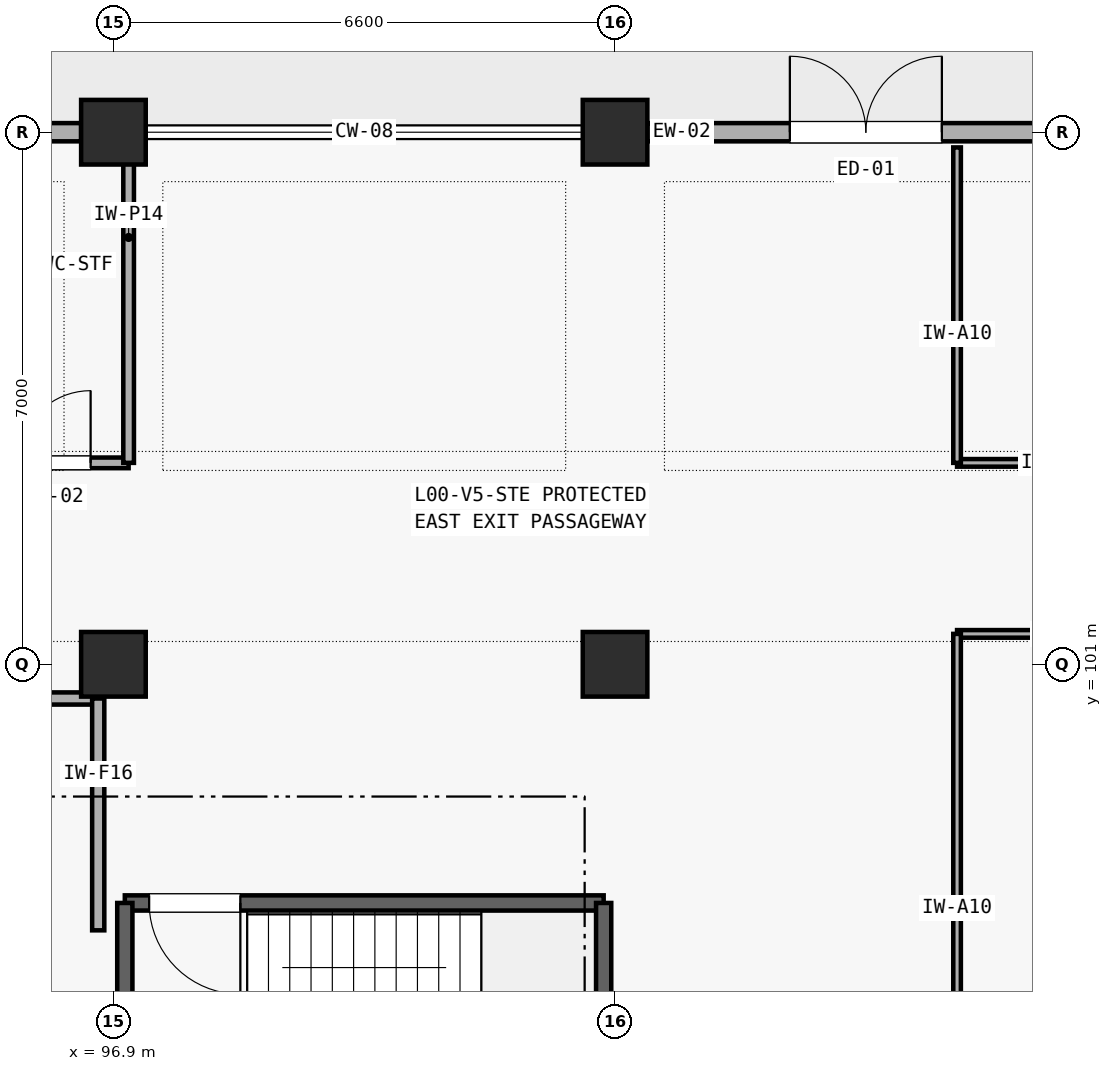
"""IFC4 building model, lengths in metres.
Left out: names, types, materials, properties, quantities, classifications, styles, units other than length and angle.
Written with IfcOpenShell. Run it as: python <this file> out.ifc"""

import sys

from ifc_helpers import new_model, si_unit, direction, frame, frame_2d, origin, origin_2d, place, context, subcontext, project, spatial, rectangle, extrude, element, fill, save


model = new_model("IFC4")
c1 = context("Model", 3, precision=1e-05, world=origin(), true_north=direction((0.0, 1.0)))
c2 = subcontext(c1, "Body", "Model", "MODEL_VIEW")
j1 = project(units=[si_unit("LENGTHUNIT", "METRE"), si_unit("PLANEANGLEUNIT", "RADIAN")], contexts=[c1])
p1 = place(None, origin())
s1 = spatial("IfcSite", under=j1, at=p1, CompositionType="ELEMENT")
p2 = place(p1, origin())
s2 = spatial("IfcBuilding", under=s1, at=p2, CompositionType="ELEMENT")
p3 = place(p2, origin())
s3 = spatial("IfcBuildingStorey", under=s2, at=p3, CompositionType="ELEMENT", Elevation=0.0)
for number, where, z_axis, x_axis in (
    (1, (96.9, 101.0, 0.0), (0.0, 0.0, 1.0), (1.0, 0.0, 0.0)),
    (2, (96.9, 108.0, 0.0), (0.0, 0.0, 1.0), (1.0, 0.0, 0.0)),
    (3, (103.5, 101.0, 0.0), (0.0, 0.0, 1.0), (1.0, 0.0, 0.0)),
    (4, (103.5, 108.0, 0.0), (0.0, 0.0, 1.0), (1.0, 0.0, 0.0)),
):
    element("IfcColumn", number, at=place(p3, frame(where, z_axis=z_axis, x_axis=x_axis)), inside=s3, PredefinedType="COLUMN", context=c2, shape_type="SweptSolid", body=[
        extrude(rectangle(XDim=0.85, YDim=0.85, at=origin_2d()), origin(), (0.0, 0.0, 1.0), 4.2),
    ])
p4 = place(p3, frame((90.725, 108.0, 0.0), z_axis=(0.0, 0.0, 1.0), x_axis=(1.0, 0.0, 0.0)))
e5 = element("IfcWall", 5, at=p4, inside=s3, PredefinedType="SOLIDWALL", context=c2, shape_type="SweptSolid", body=[
    extrude(rectangle(XDim=5.75, YDim=0.24, at=frame_2d((2.875, 0.0))), origin(), (0.0, 0.0, 1.0), 3.235),
])
p5 = place(p4, frame((1.925, 0.0, 0.85)))
e6 = element("IfcOpeningElement", 6, at=p5, cuts=e5, PredefinedType="OPENING", context=c2, shape_type="SweptSolid", body=[
    extrude(rectangle(XDim=1.9, YDim=1.25, at=frame_2d((0.95, 0.625))), frame((0.0, 0.13, 0.0), z_axis=(0.0, -1.0, 0.0), x_axis=(1.0, 0.0, 0.0)), (0.0, 0.0, 1.0), 0.26),
])
p6 = place(p3, frame((103.925, 108.0, 0.0), z_axis=(0.0, 0.0, 1.0), x_axis=(1.0, 0.0, 0.0)))
e7 = element("IfcWall", 7, at=p6, inside=s3, PredefinedType="SOLIDWALL", context=c2, shape_type="SweptSolid", body=[
    extrude(rectangle(XDim=5.75, YDim=0.24, at=frame_2d((2.875, 0.0))), origin(), (0.0, 0.0, 1.0), 3.365),
])
p7 = place(p6, frame((1.875, 0.0, 0.0)))
e8 = element("IfcOpeningElement", 8, at=p7, cuts=e7, PredefinedType="OPENING", context=c2, shape_type="SweptSolid", body=[
    extrude(rectangle(XDim=2.0, YDim=2.2, at=frame_2d((1.0, 1.1))), frame((0.0, 0.13, 0.0), z_axis=(0.0, -1.0, 0.0), x_axis=(1.0, 0.0, 0.0)), (0.0, 0.0, 1.0), 0.26),
])
p8 = place(p3, frame((97.05, 97.86, 0.0), z_axis=(0.0, 0.0, 1.0), x_axis=(1.0, 0.0, 0.0)))
e9 = element("IfcWall", 9, at=p8, inside=s3, PredefinedType="SHEAR", context=c2, shape_type="SweptSolid", body=[
    extrude(rectangle(XDim=6.3, YDim=0.2, at=frame_2d((3.15, 0.0))), origin(), (0.0, 0.0, 1.0), 4.2),
])
p9 = place(p8, frame((0.32, 0.0, 0.0)))
e10 = element("IfcOpeningElement", 10, at=p9, cuts=e9, PredefinedType="OPENING", context=c2, shape_type="SweptSolid", body=[
    extrude(rectangle(XDim=1.2, YDim=2.15, at=frame_2d((0.6, 1.075))), frame((0.0, 0.11, 0.0), z_axis=(0.0, -1.0, 0.0), x_axis=(1.0, 0.0, 0.0)), (0.0, 0.0, 1.0), 0.22),
])
for number, where, z_axis, x_axis in (
    (11, (97.05, 94.5, 0.0), (0.0, 0.0, 1.0), (0.0, 1.0, 0.0)),
    (12, (103.35, 94.5, 0.0), (0.0, 0.0, 1.0), (0.0, 1.0, 0.0)),
):
    element("IfcWall", number, at=place(p3, frame(where, z_axis=z_axis, x_axis=x_axis)), inside=s3, PredefinedType="SHEAR", context=c2, shape_type="SweptSolid", body=[
        extrude(rectangle(XDim=3.36, YDim=0.2, at=frame_2d((1.68, 0.0))), origin(), (0.0, 0.0, 1.0), 4.2),
    ])
p10 = place(p3, frame((91.5, 100.55, 0.0), z_axis=(0.0, 0.0, 1.0), x_axis=(1.0, 0.0, 0.0)))
e13 = element("IfcWall", 13, at=p10, inside=s3, PredefinedType="SOLIDWALL", context=c2, shape_type="SweptSolid", body=[
    extrude(rectangle(XDim=5.2, YDim=0.16, at=frame_2d((2.6, 0.0))), origin(), (0.0, 0.0, 1.0), 3.9),
])
p11 = place(p10, frame((1.95, 0.0, 0.0)))
e14 = element("IfcOpeningElement", 14, at=p11, cuts=e13, PredefinedType="OPENING", context=c2, shape_type="SweptSolid", body=[
    extrude(rectangle(XDim=1.3, YDim=2.15, at=frame_2d((0.65, 1.075))), frame((0.0, 0.09, 0.0), z_axis=(0.0, -1.0, 0.0), x_axis=(1.0, 0.0, 0.0)), (0.0, 0.0, 1.0), 0.18),
])
p12 = place(p3, frame((96.7, 97.5, 0.0), z_axis=(0.0, 0.0, 1.0), x_axis=(0.0, 1.0, 0.0)))
e15 = element("IfcWall", 15, at=p12, inside=s3, PredefinedType="SOLIDWALL", context=c2, shape_type="SweptSolid", body=[
    extrude(rectangle(XDim=3.05, YDim=0.16, at=frame_2d((1.525, 0.0))), origin(), (0.0, 0.0, 1.0), 3.405),
])
p13 = place(p3, frame((95.15, 103.65, 0.0), z_axis=(0.0, 0.0, 1.0), x_axis=(1.0, 0.0, 0.0)))
e16 = element("IfcWall", 16, at=p13, inside=s3, PredefinedType="PLUMBINGWALL", context=c2, shape_type="SweptSolid", body=[
    extrude(rectangle(XDim=1.95, YDim=0.14, at=frame_2d((0.975, 0.0))), origin(), (0.0, 0.0, 1.0), 3.9),
])
p14 = place(p13, frame((0.5, 0.0, 0.0)))
e17 = element("IfcOpeningElement", 17, at=p14, cuts=e16, PredefinedType="OPENING", context=c2, shape_type="SweptSolid", body=[
    extrude(rectangle(XDim=0.95, YDim=2.1, at=frame_2d((0.475, 1.05))), frame((0.0, 0.08, 0.0), z_axis=(0.0, -1.0, 0.0), x_axis=(1.0, 0.0, 0.0)), (0.0, 0.0, 1.0), 0.16),
])
p15 = place(p3, frame((97.1, 103.65, 0.0), z_axis=(0.0, 0.0, 1.0), x_axis=(0.0, 1.0, 0.0)))
e18 = element("IfcWall", 18, at=p15, inside=s3, PredefinedType="PLUMBINGWALL", context=c2, shape_type="SweptSolid", body=[
    extrude(rectangle(XDim=4.15, YDim=0.14, at=frame_2d((2.075, 0.0))), origin(), (0.0, 0.0, 1.0), 3.505),
])
p16 = place(p3, frame((108.0, 103.65, 0.0), z_axis=(0.0, 0.0, 1.0), x_axis=(1.0, 0.0, 0.0)))
e19 = element("IfcWall", 19, at=p16, inside=s3, PredefinedType="PARTITIONING", context=c2, shape_type="SweptSolid", body=[
    extrude(rectangle(XDim=8.5, YDim=0.1, at=frame_2d((4.25, 0.0))), origin(), (0.0, 0.0, 1.0), 3.9),
])
p17 = place(p16, frame((3.575, 0.0, 0.0)))
e20 = element("IfcOpeningElement", 20, at=p17, cuts=e19, PredefinedType="OPENING", context=c2, shape_type="SweptSolid", body=[
    extrude(rectangle(XDim=1.35, YDim=2.2, at=frame_2d((0.675, 1.1))), frame((0.0, 0.06, 0.0), z_axis=(0.0, -1.0, 0.0), x_axis=(1.0, 0.0, 0.0)), (0.0, 0.0, 1.0), 0.12),
])
p18 = place(p3, frame((108.0, 103.65, 0.0), z_axis=(0.0, 0.0, 1.0), x_axis=(0.0, 1.0, 0.0)))
e21 = element("IfcWall", 21, at=p18, inside=s3, PredefinedType="PARTITIONING", context=c2, shape_type="SweptSolid", body=[
    extrude(rectangle(XDim=4.15, YDim=0.1, at=frame_2d((2.075, 0.0))), origin(), (0.0, 0.0, 1.0), 3.483),
])
p19 = place(p3, frame((108.0, 101.4, 0.0), z_axis=(0.0, 0.0, 1.0), x_axis=(1.0, 0.0, 0.0)))
e22 = element("IfcWall", 22, at=p19, inside=s3, PredefinedType="PARTITIONING", context=c2, shape_type="SweptSolid", body=[
    extrude(rectangle(XDim=8.5, YDim=0.1, at=frame_2d((4.25, 0.0))), origin(), (0.0, 0.0, 1.0), 3.9),
])
p20 = place(p19, frame((3.875, 0.0, 0.0)))
e23 = element("IfcOpeningElement", 23, at=p20, cuts=e22, PredefinedType="OPENING", context=c2, shape_type="SweptSolid", body=[
    extrude(rectangle(XDim=1.55, YDim=2.2, at=frame_2d((0.775, 1.1))), frame((0.0, 0.06, 0.0), z_axis=(0.0, -1.0, 0.0), x_axis=(1.0, 0.0, 0.0)), (0.0, 0.0, 1.0), 0.12),
])
p21 = place(p3, frame((108.0, 94.2, 0.0), z_axis=(0.0, 0.0, 1.0), x_axis=(0.0, 1.0, 0.0)))
e24 = element("IfcWall", 24, at=p21, inside=s3, PredefinedType="PARTITIONING", context=c2, shape_type="SweptSolid", body=[
    extrude(rectangle(XDim=7.2, YDim=0.1, at=frame_2d((3.6, 0.0))), origin(), (0.0, 0.0, 1.0), 3.528),
])
p22 = place(p7, origin())
e25 = element("IfcDoor", 25, at=p22, inside=s3, OperationType="DOUBLE_DOOR_SINGLE_SWING", PredefinedType="DOOR", context=c2, shape_type="SweptSolid", body=[
    extrude(rectangle(XDim=2.0, YDim=2.2, at=frame_2d((1.0, 1.1))), frame((0.0, 0.025, 0.0), z_axis=(0.0, -1.0, 0.0), x_axis=(1.0, 0.0, 0.0)), (0.0, 0.0, 1.0), 0.05),
])
fill(e8, e25)
p23 = place(p9, frame((1.2, 0.0, 0.0), z_axis=(0.0, 0.0, 1.0), x_axis=(-1.0, 0.0, 0.0)))
e26 = element("IfcDoor", 26, at=p23, inside=s3, OperationType="SINGLE_SWING_LEFT", PredefinedType="DOOR", context=c2, shape_type="SweptSolid", body=[
    extrude(rectangle(XDim=1.2, YDim=2.15, at=frame_2d((0.6, 1.075))), frame((0.0, 0.025, 0.0), z_axis=(0.0, -1.0, 0.0), x_axis=(1.0, 0.0, 0.0)), (0.0, 0.0, 1.0), 0.05),
])
fill(e10, e26)
p24 = place(p14, origin())
e27 = element("IfcDoor", 27, at=p24, inside=s3, OperationType="SINGLE_SWING_RIGHT", PredefinedType="DOOR", context=c2, shape_type="SweptSolid", body=[
    extrude(rectangle(XDim=0.95, YDim=2.1, at=frame_2d((0.475, 1.05))), frame((0.0, 0.025, 0.0), z_axis=(0.0, -1.0, 0.0), x_axis=(1.0, 0.0, 0.0)), (0.0, 0.0, 1.0), 0.05),
])
fill(e17, e27)
save(model, sys.argv[1])
